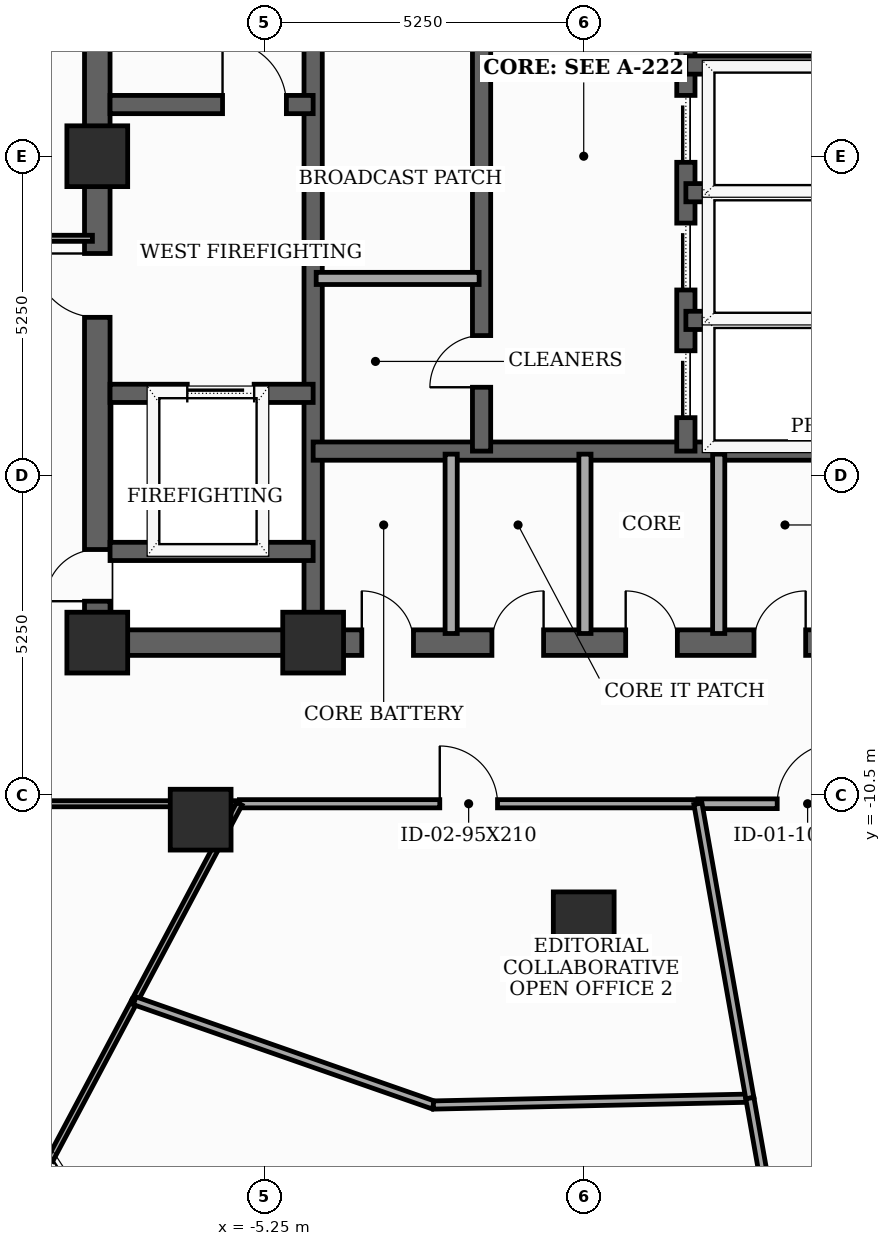
"""IFC4 building model, lengths in metres.
Left out: names, types, materials, properties, quantities, classifications, styles, units other than length and angle.
Written with IfcOpenShell. Run it as: python <this file> out.ifc"""

import sys

from ifc_helpers import new_model, si_unit, direction, frame, frame_2d, origin, origin_2d, place, context, subcontext, project, spatial, rectangle, extrude, element, fill, save


model = new_model("IFC4")
c1 = context("Model", 3, precision=1e-05, world=origin(), true_north=direction((0.0, 1.0)))
c2 = subcontext(c1, "Body", "Model", "MODEL_VIEW")
j1 = project(units=[si_unit("LENGTHUNIT", "METRE"), si_unit("PLANEANGLEUNIT", "RADIAN")], contexts=[c1])
p1 = place(None, origin())
s1 = spatial("IfcSite", under=j1, at=p1, CompositionType="ELEMENT")
p2 = place(p1, origin())
s2 = spatial("IfcBuilding", under=s1, at=p2, CompositionType="ELEMENT")
p3 = place(p2, frame((0.0, 0.0, 274.4)))
s3 = spatial("IfcBuildingStorey", under=s2, at=p3, CompositionType="ELEMENT", Elevation=274.4)
for number, where, z_axis, x_axis in (
    (1, (-8.0, -8.0, 0.0), (0.0, 0.0, 1.0), (1.0, 0.0, 0.0)),
    (2, (-4.45, -8.0, 0.0), (0.0, 0.0, 1.0), (1.0, 0.0, 0.0)),
    (3, (-8.0, 0.0, 0.0), (0.0, 0.0, 1.0), (1.0, 0.0, 0.0)),
    (4, (-6.3, -10.912, 0.0), (0.0, 0.0, 1.0), (1.0, 0.0, 0.0)),
    (5, (0.0, -12.6, 0.0), (0.0, 0.0, 1.0), (1.0, 0.0, 0.0)),
):
    element("IfcColumn", number, at=place(p3, frame(where, z_axis=z_axis, x_axis=x_axis)), inside=s3, PredefinedType="COLUMN", context=c2, shape_type="SweptSolid", body=[
        extrude(rectangle(XDim=1.0, YDim=1.0, at=origin_2d()), origin(), (0.0, 0.0, 1.0), 3.7),
    ])
p4 = place(p3, frame((-8.0, -8.0, 0.0), z_axis=(0.0, 0.0, 1.0), x_axis=(0.0, 1.0, 0.0)))
e6 = element("IfcWall", 6, at=p4, inside=s3, PredefinedType="SHEAR", context=c2, shape_type="SweptSolid", body=[
    extrude(rectangle(XDim=16.0, YDim=0.42, at=frame_2d((8.0, 0.0))), origin(), (0.0, 0.0, 1.0), 3.46),
])
p5 = place(p4, frame((0.681, 0.0, 0.0)))
e7 = element("IfcOpeningElement", 7, at=p5, cuts=e6, PredefinedType="OPENING", context=c2, shape_type="SweptSolid", body=[
    extrude(rectangle(XDim=0.85, YDim=2.02, at=frame_2d((0.425, 1.01))), frame((0.0, 0.22, 0.0), z_axis=(0.0, -1.0, 0.0), x_axis=(1.0, 0.0, 0.0)), (0.0, 0.0, 1.0), 0.44),
])
p6 = place(p4, frame((5.35, 0.0, 0.0)))
e8 = element("IfcOpeningElement", 8, at=p6, cuts=e6, PredefinedType="OPENING", context=c2, shape_type="SweptSolid", body=[
    extrude(rectangle(XDim=1.05, YDim=2.15, at=frame_2d((0.525, 1.075))), frame((0.0, 0.22, 0.0), z_axis=(0.0, -1.0, 0.0), x_axis=(1.0, 0.0, 0.0)), (0.0, 0.0, 1.0), 0.44),
])
p7 = place(p3, frame((-8.0, -8.0, 0.0), z_axis=(0.0, 0.0, 1.0), x_axis=(1.0, 0.0, 0.0)))
e9 = element("IfcWall", 9, at=p7, inside=s3, PredefinedType="SHEAR", context=c2, shape_type="SweptSolid", body=[
    extrude(rectangle(XDim=16.0, YDim=0.42, at=frame_2d((8.0, 0.0))), origin(), (0.0, 0.0, 1.0), 3.46),
])
p8 = place(p7, frame((4.35, 0.0, 0.0)))
e10 = element("IfcOpeningElement", 10, at=p8, cuts=e9, PredefinedType="OPENING", context=c2, shape_type="SweptSolid", body=[
    extrude(rectangle(XDim=0.85, YDim=2.02, at=frame_2d((0.425, 1.01))), frame((0.0, 0.22, 0.0), z_axis=(0.0, -1.0, 0.0), x_axis=(1.0, 0.0, 0.0)), (0.0, 0.0, 1.0), 0.44),
])
p9 = place(p7, frame((6.49, 0.0, 0.0)))
e11 = element("IfcOpeningElement", 11, at=p9, cuts=e9, PredefinedType="OPENING", context=c2, shape_type="SweptSolid", body=[
    extrude(rectangle(XDim=0.85, YDim=2.02, at=frame_2d((0.425, 1.01))), frame((0.0, 0.22, 0.0), z_axis=(0.0, -1.0, 0.0), x_axis=(1.0, 0.0, 0.0)), (0.0, 0.0, 1.0), 0.44),
])
p10 = place(p7, frame((8.69, 0.0, 0.0)))
e12 = element("IfcOpeningElement", 12, at=p10, cuts=e9, PredefinedType="OPENING", context=c2, shape_type="SweptSolid", body=[
    extrude(rectangle(XDim=0.85, YDim=2.02, at=frame_2d((0.425, 1.01))), frame((0.0, 0.22, 0.0), z_axis=(0.0, -1.0, 0.0), x_axis=(1.0, 0.0, 0.0)), (0.0, 0.0, 1.0), 0.44),
])
p11 = place(p7, frame((10.8, 0.0, 0.0)))
e13 = element("IfcOpeningElement", 13, at=p11, cuts=e9, PredefinedType="OPENING", context=c2, shape_type="SweptSolid", body=[
    extrude(rectangle(XDim=0.85, YDim=2.02, at=frame_2d((0.425, 1.01))), frame((0.0, 0.22, 0.0), z_axis=(0.0, -1.0, 0.0), x_axis=(1.0, 0.0, 0.0)), (0.0, 0.0, 1.0), 0.44),
])
p12 = place(p3, frame((-4.45, -7.79, 0.0), z_axis=(0.0, 0.0, 1.0), x_axis=(0.0, 1.0, 0.0)))
e14 = element("IfcWall", 14, at=p12, inside=s3, PredefinedType="SHEAR", context=c2, shape_type="SweptSolid", body=[
    extrude(rectangle(XDim=15.58, YDim=0.3, at=frame_2d((7.79, 0.0))), origin(), (0.0, 0.0, 1.0), 3.46),
])
p13 = place(p3, frame((-7.79, 0.85, 0.0), z_axis=(0.0, 0.0, 1.0), x_axis=(1.0, 0.0, 0.0)))
e15 = element("IfcWall", 15, at=p13, inside=s3, PredefinedType="SHEAR", context=c2, shape_type="SweptSolid", body=[
    extrude(rectangle(XDim=3.34, YDim=0.3, at=frame_2d((1.67, 0.0))), origin(), (0.0, 0.0, 1.0), 3.46),
])
p14 = place(p13, frame((1.85, 0.0, 0.0)))
e16 = element("IfcOpeningElement", 16, at=p14, cuts=e15, PredefinedType="OPENING", context=c2, shape_type="SweptSolid", body=[
    extrude(rectangle(XDim=1.05, YDim=2.15, at=frame_2d((0.525, 1.075))), frame((0.0, 0.16, 0.0), z_axis=(0.0, -1.0, 0.0), x_axis=(1.0, 0.0, 0.0)), (0.0, 0.0, 1.0), 0.32),
])
p15 = place(p3, frame((-7.79, -3.9, 0.0), z_axis=(0.0, 0.0, 1.0), x_axis=(1.0, 0.0, 0.0)))
e17 = element("IfcWall", 17, at=p15, inside=s3, PredefinedType="SHEAR", context=c2, shape_type="SweptSolid", body=[
    extrude(rectangle(XDim=3.34, YDim=0.3, at=frame_2d((1.67, 0.0))), origin(), (0.0, 0.0, 1.0), 3.46),
])
p16 = place(p15, frame((1.27, 0.0, 0.0)))
e18 = element("IfcOpeningElement", 18, at=p16, cuts=e17, PredefinedType="OPENING", context=c2, shape_type="SweptSolid", body=[
    extrude(rectangle(XDim=1.1, YDim=2.1, at=frame_2d((0.55, 1.05))), frame((0.0, 0.16, 0.0), z_axis=(0.0, -1.0, 0.0), x_axis=(1.0, 0.0, 0.0)), (0.0, 0.0, 1.0), 0.32),
])
p17 = place(p3, frame((-7.79, -6.5, 0.0), z_axis=(0.0, 0.0, 1.0), x_axis=(1.0, 0.0, 0.0)))
e19 = element("IfcWall", 19, at=p17, inside=s3, PredefinedType="SHEAR", context=c2, shape_type="SweptSolid", body=[
    extrude(rectangle(XDim=3.34, YDim=0.3, at=frame_2d((1.67, 0.0))), origin(), (0.0, 0.0, 1.0), 3.46),
])
p18 = place(p3, frame((-4.45, -4.85, 0.0), z_axis=(0.0, 0.0, 1.0), x_axis=(1.0, 0.0, 0.0)))
e20 = element("IfcWall", 20, at=p18, inside=s3, PredefinedType="SHEAR", context=c2, shape_type="SweptSolid", body=[
    extrude(rectangle(XDim=8.9, YDim=0.3, at=frame_2d((4.45, 0.0))), origin(), (0.0, 0.0, 1.0), 3.46),
])
p19 = place(p3, frame((-1.68, -4.85, 0.0), z_axis=(0.0, 0.0, 1.0), x_axis=(0.0, 1.0, 0.0)))
e21 = element("IfcWall", 21, at=p19, inside=s3, PredefinedType="SHEAR", context=c2, shape_type="SweptSolid", body=[
    extrude(rectangle(XDim=12.64, YDim=0.3, at=frame_2d((6.32, 0.0))), origin(), (0.0, 0.0, 1.0), 3.46),
])
p20 = place(p19, frame((1.05, 0.0, 0.0)))
e22 = element("IfcOpeningElement", 22, at=p20, cuts=e21, PredefinedType="OPENING", context=c2, shape_type="SweptSolid", body=[
    extrude(rectangle(XDim=0.85, YDim=2.02, at=frame_2d((0.425, 1.01))), frame((0.0, 0.16, 0.0), z_axis=(0.0, -1.0, 0.0), x_axis=(1.0, 0.0, 0.0)), (0.0, 0.0, 1.0), 0.32),
])
p21 = place(p19, frame((6.8, 0.0, 0.0)))
e23 = element("IfcOpeningElement", 23, at=p21, cuts=e21, PredefinedType="OPENING", context=c2, shape_type="SweptSolid", body=[
    extrude(rectangle(XDim=0.95, YDim=2.1, at=frame_2d((0.475, 1.05))), frame((0.0, 0.16, 0.0), z_axis=(0.0, -1.0, 0.0), x_axis=(1.0, 0.0, 0.0)), (0.0, 0.0, 1.0), 0.32),
])
p22 = place(p3, frame((1.68, -4.85, 0.0), z_axis=(0.0, 0.0, 1.0), x_axis=(0.0, 1.0, 0.0)))
e24 = element("IfcWall", 24, at=p22, inside=s3, PredefinedType="SHEAR", context=c2, shape_type="SweptSolid", body=[
    extrude(rectangle(XDim=12.64, YDim=0.3, at=frame_2d((6.32, 0.0))), origin(), (0.0, 0.0, 1.0), 3.46),
])
p23 = place(p22, frame((0.55, 0.0, 0.0)))
e25 = element("IfcOpeningElement", 25, at=p23, cuts=e24, PredefinedType="OPENING", context=c2, shape_type="SweptSolid", body=[
    extrude(rectangle(XDim=1.1, YDim=2.1, at=frame_2d((0.55, 1.05))), frame((0.0, 0.16, 0.0), z_axis=(0.0, -1.0, 0.0), x_axis=(1.0, 0.0, 0.0)), (0.0, 0.0, 1.0), 0.32),
])
p24 = place(p22, frame((2.65, 0.0, 0.0)))
e26 = element("IfcOpeningElement", 26, at=p24, cuts=e24, PredefinedType="OPENING", context=c2, shape_type="SweptSolid", body=[
    extrude(rectangle(XDim=1.1, YDim=2.1, at=frame_2d((0.55, 1.05))), frame((0.0, 0.16, 0.0), z_axis=(0.0, -1.0, 0.0), x_axis=(1.0, 0.0, 0.0)), (0.0, 0.0, 1.0), 0.32),
])
p25 = place(p22, frame((4.75, 0.0, 0.0)))
e27 = element("IfcOpeningElement", 27, at=p25, cuts=e24, PredefinedType="OPENING", context=c2, shape_type="SweptSolid", body=[
    extrude(rectangle(XDim=1.1, YDim=2.1, at=frame_2d((0.55, 1.05))), frame((0.0, 0.16, 0.0), z_axis=(0.0, -1.0, 0.0), x_axis=(1.0, 0.0, 0.0)), (0.0, 0.0, 1.0), 0.32),
])
p26 = place(p22, frame((6.8, 0.0, 0.0)))
e28 = element("IfcOpeningElement", 28, at=p26, cuts=e24, PredefinedType="OPENING", context=c2, shape_type="SweptSolid", body=[
    extrude(rectangle(XDim=0.92, YDim=2.1, at=frame_2d((0.46, 1.05))), frame((0.0, 0.16, 0.0), z_axis=(0.0, -1.0, 0.0), x_axis=(1.0, 0.0, 0.0)), (0.0, 0.0, 1.0), 0.32),
])
p27 = place(p22, frame((9.8, 0.0, 0.0)))
e29 = element("IfcOpeningElement", 29, at=p27, cuts=e24, PredefinedType="OPENING", context=c2, shape_type="SweptSolid", body=[
    extrude(rectangle(XDim=0.95, YDim=2.1, at=frame_2d((0.475, 1.05))), frame((0.0, 0.16, 0.0), z_axis=(0.0, -1.0, 0.0), x_axis=(1.0, 0.0, 0.0)), (0.0, 0.0, 1.0), 0.32),
])
for number, where, z_axis, x_axis in (
    (30, (1.68, 1.5, 0.0), (0.0, 0.0, 1.0), (1.0, 0.0, 0.0)),
    (31, (1.68, -2.7, 0.0), (0.0, 0.0, 1.0), (1.0, 0.0, 0.0)),
    (32, (1.68, -0.6, 0.0), (0.0, 0.0, 1.0), (1.0, 0.0, 0.0)),
):
    element("IfcWall", number, at=place(p3, frame(where, z_axis=z_axis, x_axis=x_axis)), inside=s3, PredefinedType="SHEAR", context=c2, shape_type="SweptSolid", body=[
        extrude(rectangle(XDim=2.77, YDim=0.3, at=frame_2d((1.385, 0.0))), origin(), (0.0, 0.0, 1.0), 3.46),
    ])
for number, where, z_axis, x_axis in (
    (33, (-2.18, -7.85, 0.0), (0.0, 0.0, 1.0), (0.0, 1.0, 0.0)),
    (34, (0.02, -7.85, 0.0), (0.0, 0.0, 1.0), (0.0, 1.0, 0.0)),
    (35, (2.22, -7.85, 0.0), (0.0, 0.0, 1.0), (0.0, 1.0, 0.0)),
):
    element("IfcWall", number, at=place(p3, frame(where, z_axis=z_axis, x_axis=x_axis)), inside=s3, PredefinedType="SOLIDWALL", context=c2, shape_type="SweptSolid", body=[
        extrude(rectangle(XDim=2.95, YDim=0.2, at=frame_2d((1.475, 0.0))), origin(), (0.0, 0.0, 1.0), 2.845),
    ])
p28 = place(p3, frame((-4.4, -2.01, 0.0), z_axis=(0.0, 0.0, 1.0), x_axis=(1.0, 0.0, 0.0)))
e36 = element("IfcWall", 36, at=p28, inside=s3, PredefinedType="SOLIDWALL", context=c2, shape_type="SweptSolid", body=[
    extrude(rectangle(XDim=2.68, YDim=0.2, at=frame_2d((1.34, 0.0))), origin(), (0.0, 0.0, 1.0), 3.46),
])
p29 = place(p3, frame((-8.08, -1.35, 0.0), z_axis=(0.0, 0.0, 1.0), x_axis=(-1.0, 0.0, 0.0)))
e37 = element("IfcWall", 37, at=p29, inside=s3, PredefinedType="MOVABLE", context=c2, shape_type="SweptSolid", body=[
    extrude(rectangle(XDim=2.57, YDim=0.1, at=frame_2d((1.285, 0.0))), origin(), (0.0, 0.0, 1.0), 2.845),
])
p30 = place(p3, frame((-10.15, -10.65, 0.0), z_axis=(0.0, 0.0, 1.0), x_axis=(1.0, 0.0, 0.0)))
e38 = element("IfcWall", 38, at=p30, inside=s3, PredefinedType="MOVABLE", context=c2, shape_type="SweptSolid", body=[
    extrude(rectangle(XDim=4.487, YDim=0.1, at=frame_2d((2.243, 0.0))), origin(), (0.0, 0.0, 1.0), 2.045),
])
p31 = place(p3, frame((-5.663, -10.65, 0.0), z_axis=(0.0, 0.0, 1.0), x_axis=(1.0, 0.0, 0.0)))
e39 = element("IfcWall", 39, at=p31, inside=s3, PredefinedType="PARTITIONING", context=c2, shape_type="SweptSolid", body=[
    extrude(rectangle(XDim=7.541, YDim=0.135, at=frame_2d((3.771, 0.0))), origin(), (0.0, 0.0, 1.0), 2.845),
])
p32 = place(p31, frame((3.295, 0.0, 0.0)))
e40 = element("IfcOpeningElement", 40, at=p32, cuts=e39, PredefinedType="OPENING", context=c2, shape_type="SweptSolid", body=[
    extrude(rectangle(XDim=0.95, YDim=2.1, at=frame_2d((0.475, 1.05))), frame((0.0, 0.077, 0.0), z_axis=(0.0, -1.0, 0.0), x_axis=(1.0, 0.0, 0.0)), (0.0, 0.0, 1.0), 0.155),
])
p33 = place(p3, frame((1.878, -10.65, 0.0), z_axis=(0.0, 0.0, 1.0), x_axis=(1.0, 0.0, 0.0)))
e41 = element("IfcWall", 41, at=p33, inside=s3, PredefinedType="PARTITIONING", context=c2, shape_type="SweptSolid", body=[
    extrude(rectangle(XDim=6.443, YDim=0.16, at=frame_2d((3.222, 0.0))), origin(), (0.0, 0.0, 1.0), 2.845),
])
p34 = place(p33, frame((1.304, 0.0, 0.0)))
e42 = element("IfcOpeningElement", 42, at=p34, cuts=e41, PredefinedType="OPENING", context=c2, shape_type="SweptSolid", body=[
    extrude(rectangle(XDim=1.0, YDim=2.15, at=frame_2d((0.5, 1.075))), frame((0.0, 0.09, 0.0), z_axis=(0.0, -1.0, 0.0), x_axis=(1.0, 0.0, 0.0)), (0.0, 0.0, 1.0), 0.18),
])
p35 = place(p3, frame((-7.385, -13.89, 0.0), z_axis=(0.0, 0.0, 1.0), x_axis=(0.469299548001, 0.883039033252, 0.0)))
e43 = element("IfcWall", 43, at=p35, inside=s3, PredefinedType="MOVABLE", context=c2, shape_type="SweptSolid", body=[
    extrude(rectangle(XDim=3.669, YDim=0.1, at=frame_2d((1.834, 0.0))), origin(), (0.0, 0.0, 1.0), 2.045),
])
p36 = place(p3, frame((-8.778, -16.509, 0.0), z_axis=(0.0, 0.0, 1.0), x_axis=(0.469528331535, 0.882917406039, 0.0)))
e44 = element("IfcWall", 44, at=p36, inside=s3, PredefinedType="MOVABLE", context=c2, shape_type="SweptSolid", body=[
    extrude(rectangle(XDim=2.966, YDim=0.1, at=frame_2d((1.483, 0.0))), origin(), (0.0, 0.0, 1.0), 2.045),
])
p37 = place(p3, frame((-7.385, -13.89, 0.0), z_axis=(0.0, 0.0, 1.0), x_axis=(0.944127206291, -0.329581277291, 0.0)))
e45 = element("IfcWall", 45, at=p37, inside=s3, PredefinedType="PARTITIONING", context=c2, shape_type="SweptSolid", body=[
    extrude(rectangle(XDim=5.204, YDim=0.135, at=frame_2d((2.602, 0.0))), origin(), (0.0, 0.0, 1.0), 2.045),
])
p38 = place(p3, frame((-2.472, -15.605, 0.0), z_axis=(0.0, 0.0, 1.0), x_axis=(0.999764165326, 0.021716669413, 0.0)))
e46 = element("IfcWall", 46, at=p38, inside=s3, PredefinedType="PARTITIONING", context=c2, shape_type="SweptSolid", body=[
    extrude(rectangle(XDim=5.205, YDim=0.135, at=frame_2d((2.603, 0.0))), origin(), (0.0, 0.0, 1.0), 2.045),
])
p39 = place(p3, frame((2.732, -15.492, 0.0), z_axis=(0.0, 0.0, 1.0), x_axis=(-0.173691855807, 0.984800050379, 0.0)))
e47 = element("IfcWall", 47, at=p39, inside=s3, PredefinedType="PARTITIONING", context=c2, shape_type="SweptSolid", body=[
    extrude(rectangle(XDim=4.917, YDim=0.135, at=frame_2d((2.458, 0.0))), origin(), (0.0, 0.0, 1.0), 2.845),
])
p40 = place(p3, frame((4.719, -26.759, 0.0), z_axis=(0.0, 0.0, 1.0), x_axis=(-0.173634384425, 0.984810185033, 0.0)))
e48 = element("IfcWall", 48, at=p40, inside=s3, PredefinedType="PARTITIONING", context=c2, shape_type="SweptSolid", body=[
    extrude(rectangle(XDim=11.441, YDim=0.135, at=frame_2d((5.721, 0.0))), origin(), (0.0, 0.0, 1.0), 2.045),
])
p41 = place(p40, frame((5.26, 0.0, 0.0)))
e49 = element("IfcOpeningElement", 49, at=p41, cuts=e48, PredefinedType="OPENING", context=c2, shape_type="SweptSolid", body=[
    extrude(rectangle(XDim=0.92, YDim=2.0, at=frame_2d((0.46, 1.0))), frame((0.0, 0.077, 0.0), z_axis=(0.0, -1.0, 0.0), x_axis=(1.0, 0.0, 0.0)), (0.0, 0.0, 1.0), 0.155),
])
p42 = place(p5, origin())
e50 = element("IfcDoor", 50, at=p42, inside=s3, OperationType="SINGLE_SWING_LEFT", PredefinedType="TRAPDOOR", context=c2, shape_type="SweptSolid", body=[
    extrude(rectangle(XDim=0.85, YDim=2.02, at=frame_2d((0.425, 1.01))), frame((0.0, 0.025, 0.0), z_axis=(0.0, -1.0, 0.0), x_axis=(1.0, 0.0, 0.0)), (0.0, 0.0, 1.0), 0.05),
])
fill(e7, e50)
p43 = place(p6, origin())
e51 = element("IfcDoor", 51, at=p43, inside=s3, OperationType="SINGLE_SWING_RIGHT", PredefinedType="DOOR", context=c2, shape_type="SweptSolid", body=[
    extrude(rectangle(XDim=1.05, YDim=2.15, at=frame_2d((0.525, 1.075))), frame((0.0, 0.025, 0.0), z_axis=(0.0, -1.0, 0.0), x_axis=(1.0, 0.0, 0.0)), (0.0, 0.0, 1.0), 0.05),
])
fill(e8, e51)
p44 = place(p8, origin())
e52 = element("IfcDoor", 52, at=p44, inside=s3, OperationType="SINGLE_SWING_LEFT", PredefinedType="TRAPDOOR", context=c2, shape_type="SweptSolid", body=[
    extrude(rectangle(XDim=0.85, YDim=2.02, at=frame_2d((0.425, 1.01))), frame((0.0, 0.025, 0.0), z_axis=(0.0, -1.0, 0.0), x_axis=(1.0, 0.0, 0.0)), (0.0, 0.0, 1.0), 0.05),
])
fill(e10, e52)
p45 = place(p9, origin())
e53 = element("IfcDoor", 53, at=p45, inside=s3, OperationType="SINGLE_SWING_RIGHT", PredefinedType="TRAPDOOR", context=c2, shape_type="SweptSolid", body=[
    extrude(rectangle(XDim=0.85, YDim=2.02, at=frame_2d((0.425, 1.01))), frame((0.0, 0.025, 0.0), z_axis=(0.0, -1.0, 0.0), x_axis=(1.0, 0.0, 0.0)), (0.0, 0.0, 1.0), 0.05),
])
fill(e11, e53)
p46 = place(p10, origin())
e54 = element("IfcDoor", 54, at=p46, inside=s3, OperationType="SINGLE_SWING_LEFT", PredefinedType="TRAPDOOR", context=c2, shape_type="SweptSolid", body=[
    extrude(rectangle(XDim=0.85, YDim=2.02, at=frame_2d((0.425, 1.01))), frame((0.0, 0.025, 0.0), z_axis=(0.0, -1.0, 0.0), x_axis=(1.0, 0.0, 0.0)), (0.0, 0.0, 1.0), 0.05),
])
fill(e12, e54)
p47 = place(p11, origin())
e55 = element("IfcDoor", 55, at=p47, inside=s3, OperationType="SINGLE_SWING_RIGHT", PredefinedType="TRAPDOOR", context=c2, shape_type="SweptSolid", body=[
    extrude(rectangle(XDim=0.85, YDim=2.02, at=frame_2d((0.425, 1.01))), frame((0.0, 0.025, 0.0), z_axis=(0.0, -1.0, 0.0), x_axis=(1.0, 0.0, 0.0)), (0.0, 0.0, 1.0), 0.05),
])
fill(e13, e55)
p48 = place(p14, origin())
e56 = element("IfcDoor", 56, at=p48, inside=s3, OperationType="SINGLE_SWING_LEFT", PredefinedType="DOOR", context=c2, shape_type="SweptSolid", body=[
    extrude(rectangle(XDim=1.05, YDim=2.15, at=frame_2d((0.525, 1.075))), frame((0.0, 0.025, 0.0), z_axis=(0.0, -1.0, 0.0), x_axis=(1.0, 0.0, 0.0)), (0.0, 0.0, 1.0), 0.05),
])
fill(e16, e56)
p49 = place(p16, origin())
e57 = element("IfcDoor", 57, at=p49, inside=s3, OperationType="SLIDING_TO_LEFT", PredefinedType="DOOR", context=c2, shape_type="SweptSolid", body=[
    extrude(rectangle(XDim=1.1, YDim=2.1, at=frame_2d((0.55, 1.05))), frame((0.0, 0.025, 0.0), z_axis=(0.0, -1.0, 0.0), x_axis=(1.0, 0.0, 0.0)), (0.0, 0.0, 1.0), 0.05),
])
fill(e18, e57)
p50 = place(p20, origin())
e58 = element("IfcDoor", 58, at=p50, inside=s3, OperationType="SINGLE_SWING_LEFT", PredefinedType="TRAPDOOR", context=c2, shape_type="SweptSolid", body=[
    extrude(rectangle(XDim=0.85, YDim=2.02, at=frame_2d((0.425, 1.01))), frame((0.0, 0.025, 0.0), z_axis=(0.0, -1.0, 0.0), x_axis=(1.0, 0.0, 0.0)), (0.0, 0.0, 1.0), 0.05),
])
fill(e22, e58)
p51 = place(p23, origin())
e59 = element("IfcDoor", 59, at=p51, inside=s3, OperationType="SLIDING_TO_LEFT", PredefinedType="DOOR", context=c2, shape_type="SweptSolid", body=[
    extrude(rectangle(XDim=1.1, YDim=2.1, at=frame_2d((0.55, 1.05))), frame((0.0, 0.025, 0.0), z_axis=(0.0, -1.0, 0.0), x_axis=(1.0, 0.0, 0.0)), (0.0, 0.0, 1.0), 0.05),
])
fill(e25, e59)
p52 = place(p24, origin())
e60 = element("IfcDoor", 60, at=p52, inside=s3, OperationType="SLIDING_TO_LEFT", PredefinedType="DOOR", context=c2, shape_type="SweptSolid", body=[
    extrude(rectangle(XDim=1.1, YDim=2.1, at=frame_2d((0.55, 1.05))), frame((0.0, 0.025, 0.0), z_axis=(0.0, -1.0, 0.0), x_axis=(1.0, 0.0, 0.0)), (0.0, 0.0, 1.0), 0.05),
])
fill(e26, e60)
p53 = place(p25, origin())
e61 = element("IfcDoor", 61, at=p53, inside=s3, OperationType="SLIDING_TO_LEFT", PredefinedType="DOOR", context=c2, shape_type="SweptSolid", body=[
    extrude(rectangle(XDim=1.1, YDim=2.1, at=frame_2d((0.55, 1.05))), frame((0.0, 0.025, 0.0), z_axis=(0.0, -1.0, 0.0), x_axis=(1.0, 0.0, 0.0)), (0.0, 0.0, 1.0), 0.05),
])
fill(e27, e61)
p54 = place(p32, origin())
e62 = element("IfcDoor", 62, at=p54, inside=s3, OperationType="SINGLE_SWING_LEFT", PredefinedType="DOOR", context=c2, shape_type="SweptSolid", body=[
    extrude(rectangle(XDim=0.95, YDim=2.1, at=frame_2d((0.475, 1.05))), frame((0.0, 0.025, 0.0), z_axis=(0.0, -1.0, 0.0), x_axis=(1.0, 0.0, 0.0)), (0.0, 0.0, 1.0), 0.05),
])
fill(e40, e62)
p55 = place(p34, origin())
e63 = element("IfcDoor", 63, at=p55, inside=s3, OperationType="SINGLE_SWING_RIGHT", PredefinedType="DOOR", context=c2, shape_type="SweptSolid", body=[
    extrude(rectangle(XDim=1.0, YDim=2.15, at=frame_2d((0.5, 1.075))), frame((0.0, 0.025, 0.0), z_axis=(0.0, -1.0, 0.0), x_axis=(1.0, 0.0, 0.0)), (0.0, 0.0, 1.0), 0.05),
])
fill(e42, e63)
save(model, sys.argv[1])
